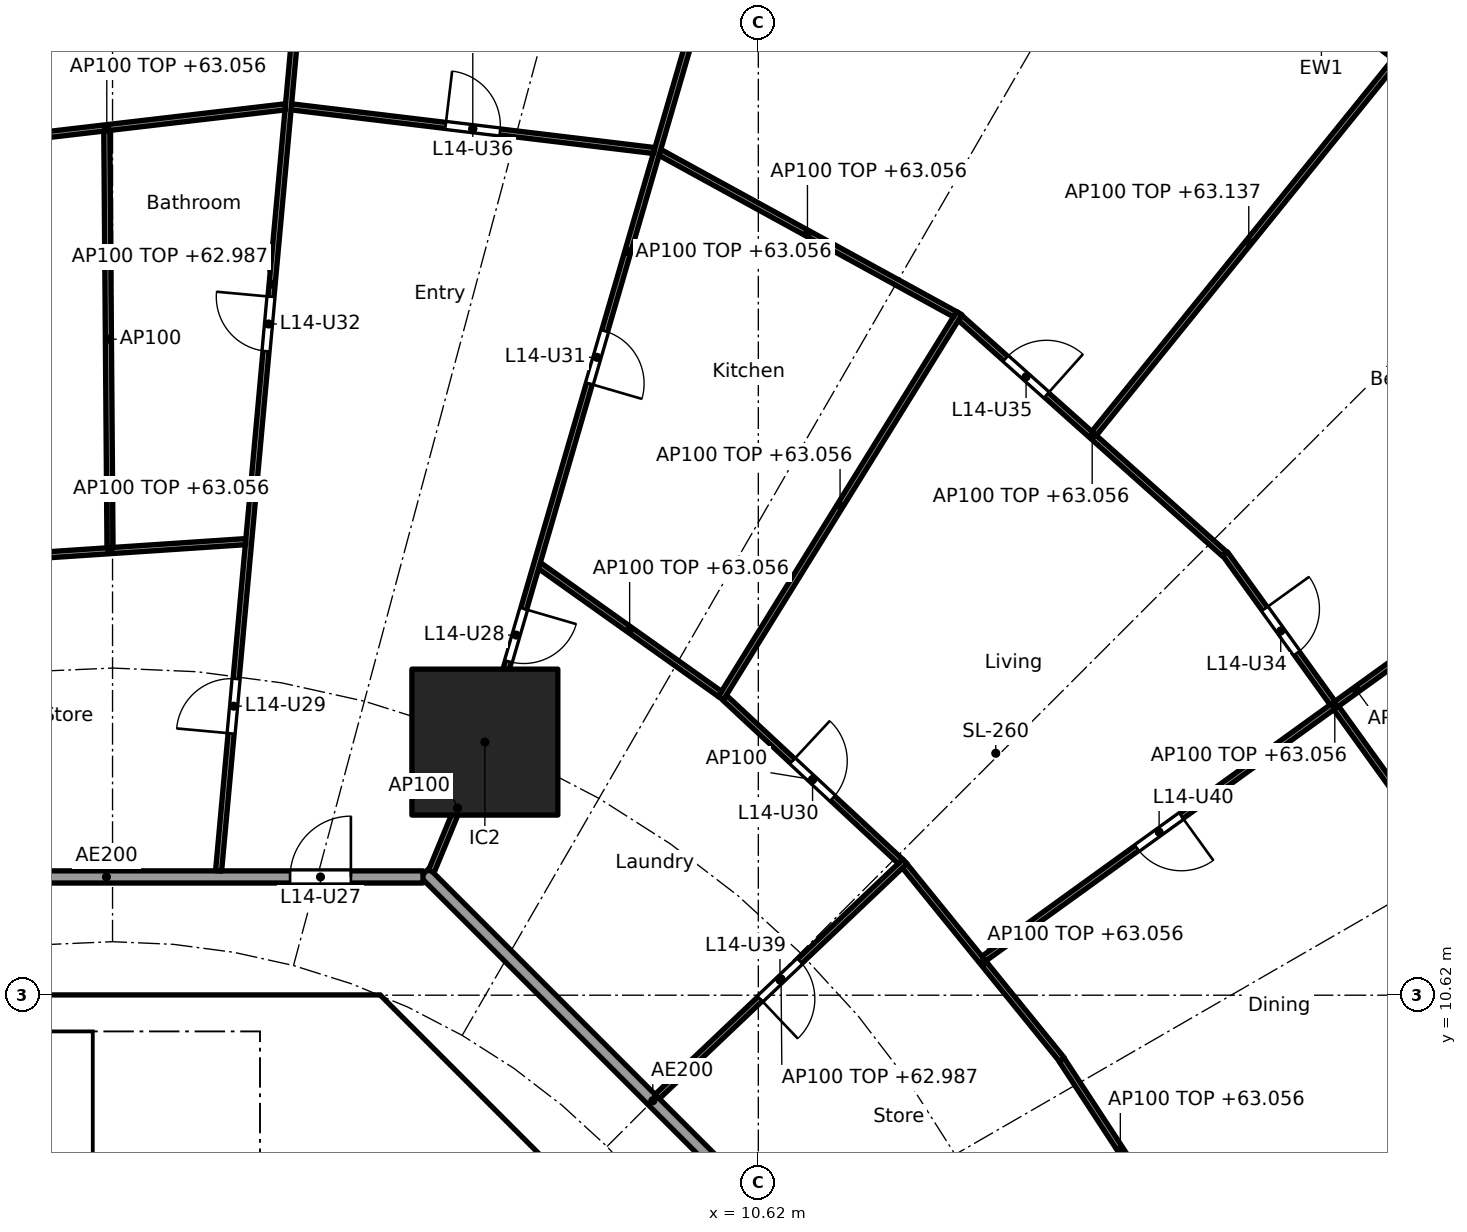
"""IFC4 building model, lengths in metres.
Left out: names, types, materials, properties, quantities, classifications, styles, units other than length and angle.
Written with IfcOpenShell. Run it as: python <this file> out.ifc"""

import sys

from ifc_helpers import new_model, si_unit, direction, frame, frame_2d, origin, origin_2d, place, context, subcontext, project, spatial, polyline, rectangle, outline, extrude, element, fill, save


model = new_model("IFC4")
c1 = context("Model", 3, precision=1e-05, world=origin(), true_north=direction((0.0, 1.0)))
c2 = subcontext(c1, "Body", "Model", "MODEL_VIEW")
j1 = project(units=[si_unit("LENGTHUNIT", "METRE"), si_unit("PLANEANGLEUNIT", "RADIAN")], contexts=[c1])
p1 = place(None, origin())
s1 = spatial("IfcSite", under=j1, at=p1, CompositionType="ELEMENT")
p2 = place(p1, origin())
s2 = spatial("IfcBuilding", under=s1, at=p2, CompositionType="ELEMENT")
p3 = place(p2, frame((0.0, 0.0, 60.3)))
s3 = spatial("IfcBuildingStorey", under=s2, at=p3, CompositionType="ELEMENT", Elevation=60.3)
p4 = place(p3, frame((6.123, 14.782, 0.0), z_axis=(0.0, 0.0, 1.0), x_axis=(1.0, 0.0, 0.0)))
e1 = element("IfcColumn", 1, at=p4, inside=s3, PredefinedType="COLUMN", context=c2, shape_type="SweptSolid", body=[
    extrude(rectangle(XDim=2.4, YDim=2.4, at=origin_2d()), origin(), (0.0, 0.0, 1.0), 3.7),
])
p5 = place(p3, frame((18.582, 28.056, 0.0), z_axis=(0.0, 0.0, 1.0), x_axis=(0.796022293214, -0.605267303517, 0.0)))
e2 = element("IfcWall", 2, at=p5, inside=s3, PredefinedType="SOLIDWALL", context=c2, shape_type="SweptSolid", body=[
    extrude(rectangle(XDim=3.262, YDim=0.25, at=frame_2d((1.631, 0.0))), origin(), (0.0, 0.0, 1.0), 3.44),
])
p6 = place(p5, frame((0.581, 0.0, 0.0)))
e3 = element("IfcOpeningElement", 3, at=p6, cuts=e2, PredefinedType="OPENING", context=c2, shape_type="SweptSolid", body=[
    extrude(rectangle(XDim=2.1, YDim=2.4, at=frame_2d((1.05, 1.2))), frame((0.0, 0.135, 0.0), z_axis=(0.0, -1.0, 0.0), x_axis=(1.0, 0.0, 0.0)), (0.0, 0.0, 1.0), 0.27),
])
p7 = place(p3, frame((9.988, 4.613, 0.0), z_axis=(0.0, 0.0, 1.0), x_axis=(-0.707106781187, 0.707106781187, 0.0)))
e4 = element("IfcWall", 4, at=p7, inside=s3, PredefinedType="SHEAR", context=c2, shape_type="SweptSolid", body=[
    extrude(rectangle(XDim=7.602, YDim=0.6, at=frame_2d((3.801, 0.0))), origin(), (0.0, 0.0, 1.0), 3.44),
])
p8 = place(p7, frame((3.201, 0.0, 0.0)))
e5 = element("IfcOpeningElement", 5, at=p8, cuts=e4, PredefinedType="OPENING", context=c2, shape_type="SweptSolid", body=[
    extrude(rectangle(XDim=1.2, YDim=2.1, at=frame_2d((0.6, 1.05))), frame((0.0, 0.31, 0.0), z_axis=(0.0, -1.0, 0.0), x_axis=(1.0, 0.0, 0.0)), (0.0, 0.0, 1.0), 0.62),
])
p9 = place(p3, frame((4.0, 7.025, 0.0), z_axis=(0.0, 0.0, 1.0), x_axis=(0.0, 1.0, 0.0)))
e6 = element("IfcWall", 6, at=p9, inside=s3, PredefinedType="SOLIDWALL", context=c2, shape_type="SweptSolid", body=[
    extrude(rectangle(XDim=3.0, YDim=0.2, at=frame_2d((1.5, 0.0))), origin(), (0.0, 0.0, 1.0), 3.44),
])
p10 = place(p9, frame((0.925, 0.0, 0.0)))
e7 = element("IfcOpeningElement", 7, at=p10, cuts=e6, PredefinedType="OPENING", context=c2, shape_type="SweptSolid", body=[
    extrude(rectangle(XDim=1.1, YDim=2.1, at=frame_2d((0.55, 1.05))), frame((0.0, 0.11, 0.0), z_axis=(0.0, -1.0, 0.0), x_axis=(1.0, 0.0, 0.0)), (0.0, 0.0, 1.0), 0.22),
])
p11 = place(p3, origin())
e8 = element("IfcWall", 8, at=p11, inside=s3, PredefinedType="SHEAR", context=c2, shape_type="SweptSolid", body=[
    extrude(outline(polyline([(-4.152, 10.025), (-4.401, 9.776), (-4.825, 10.2), (-4.401, 10.625), (4.401, 10.625), (4.825, 10.2), (4.401, 9.776), (4.152, 10.025), (-4.152, 10.025)])), origin(), (0.0, 0.0, 1.0), 3.44),
])
p12 = place(p3, frame((14.832, 6.13, 0.0), z_axis=(0.0, 0.0, 1.0), x_axis=(0.989836541293, 0.142209779978, 0.0)))
e9 = element("IfcWall", 9, at=p12, inside=s3, PredefinedType="PARTITIONING", context=c2, shape_type="SweptSolid", body=[
    extrude(rectangle(XDim=15.909, YDim=0.2, at=frame_2d((7.955, 0.0))), origin(), (0.0, 0.0, 1.0), 2.756),
])
p13 = place(p3, frame((12.635, 5.134, 0.0), z_axis=(0.0, 0.0, 1.0), x_axis=(-0.707106781187, 0.707106781187, 0.0)))
e10 = element("IfcWall", 10, at=p13, inside=s3, PredefinedType="PARTITIONING", context=c2, shape_type="SweptSolid", body=[
    extrude(rectangle(XDim=10.609, YDim=0.2, at=frame_2d((5.305, 0.0))), origin(), (0.0, 0.0, 1.0), 3.44),
])
p14 = place(p3, frame((5.104, 12.565, 0.0), z_axis=(0.0, 0.0, 1.0), x_axis=(-1.0, 0.0, 0.0)))
e11 = element("IfcWall", 11, at=p14, inside=s3, PredefinedType="PARTITIONING", context=c2, shape_type="SweptSolid", body=[
    extrude(rectangle(XDim=10.409, YDim=0.2, at=frame_2d((5.205, 0.0))), origin(), (0.0, 0.0, 1.0), 3.44),
])
p15 = place(p14, frame((1.185, 0.0, 0.0)))
e12 = element("IfcOpeningElement", 12, at=p15, cuts=e11, PredefinedType="OPENING", context=c2, shape_type="SweptSolid", body=[
    extrude(rectangle(XDim=1.0, YDim=2.1, at=frame_2d((0.5, 1.05))), frame((0.0, 0.11, 0.0), z_axis=(0.0, -1.0, 0.0), x_axis=(1.0, 0.0, 0.0)), (0.0, 0.0, 1.0), 0.22),
])
p16 = place(p3, frame((17.537, 6.61, 0.0), z_axis=(0.0, 0.0, 1.0), x_axis=(-0.547637987196, 0.836715384692, 0.0)))
e13 = element("IfcWall", 13, at=p16, inside=s3, PredefinedType="PARTITIONING", context=c2, shape_type="SweptSolid", body=[
    extrude(rectangle(XDim=3.52, YDim=0.1, at=frame_2d((1.76, 0.0))), origin(), (0.0, 0.0, 1.0), 2.756),
])
p17 = place(p3, frame((15.614, 9.559, 0.0), z_axis=(0.0, 0.0, 1.0), x_axis=(-0.63012473344, 0.776493928056, 0.0)))
e14 = element("IfcWall", 14, at=p17, inside=s3, PredefinedType="PARTITIONING", context=c2, shape_type="SweptSolid", body=[
    extrude(rectangle(XDim=4.106, YDim=0.1, at=frame_2d((2.053, 0.0))), origin(), (0.0, 0.0, 1.0), 2.756),
])
p18 = place(p3, frame((21.908, 12.866, 0.0), z_axis=(0.0, 0.0, 1.0), x_axis=(-0.584553256988, 0.811355341231, 0.0)))
e15 = element("IfcWall", 15, at=p18, inside=s3, PredefinedType="PARTITIONING", context=c2, shape_type="SweptSolid", body=[
    extrude(rectangle(XDim=6.184, YDim=0.1, at=frame_2d((3.092, 0.0))), origin(), (0.0, 0.0, 1.0), 2.756),
])
p19 = place(p18, frame((4.163, 0.0, 0.0)))
e16 = element("IfcOpeningElement", 16, at=p19, cuts=e15, PredefinedType="OPENING", context=c2, shape_type="SweptSolid", body=[
    extrude(rectangle(XDim=0.9, YDim=2.1, at=frame_2d((0.45, 1.05))), frame((0.0, 0.06, 0.0), z_axis=(0.0, -1.0, 0.0), x_axis=(1.0, 0.0, 0.0)), (0.0, 0.0, 1.0), 0.12),
])
p20 = place(p3, frame((14.329, 11.221, 0.0), z_axis=(0.0, 0.0, 1.0), x_axis=(0.810671130917, 0.58550176558, 0.0)))
e17 = element("IfcWall", 17, at=p20, inside=s3, PredefinedType="PARTITIONING", context=c2, shape_type="SweptSolid", body=[
    extrude(rectangle(XDim=15.106, YDim=0.1, at=frame_2d((7.553, 0.0))), origin(), (0.0, 0.0, 1.0), 2.837),
])
p21 = place(p20, frame((3.105, 0.0, 0.0)))
e18 = element("IfcOpeningElement", 18, at=p21, cuts=e17, PredefinedType="OPENING", context=c2, shape_type="SweptSolid", body=[
    extrude(rectangle(XDim=0.9, YDim=2.1, at=frame_2d((0.45, 1.05))), frame((0.0, 0.06, 0.0), z_axis=(0.0, -1.0, 0.0), x_axis=(1.0, 0.0, 0.0)), (0.0, 0.0, 1.0), 0.12),
])
p22 = place(p3, frame((8.957, 8.953, 0.0), z_axis=(0.0, 0.0, 1.0), x_axis=(0.725253319157, 0.688482115273, 0.0)))
e19 = element("IfcWall", 19, at=p22, inside=s3, PredefinedType="PARTITIONING", context=c2, shape_type="SweptSolid", body=[
    extrude(rectangle(XDim=5.617, YDim=0.1, at=frame_2d((2.809, 0.0))), origin(), (0.0, 0.0, 1.0), 2.687),
])
p23 = place(p22, frame((2.333, 0.0, 0.0)))
e20 = element("IfcOpeningElement", 20, at=p23, cuts=e19, PredefinedType="OPENING", context=c2, shape_type="SweptSolid", body=[
    extrude(rectangle(XDim=0.9, YDim=2.1, at=frame_2d((0.45, 1.05))), frame((0.0, 0.06, 0.0), z_axis=(0.0, -1.0, 0.0), x_axis=(1.0, 0.0, 0.0)), (0.0, 0.0, 1.0), 0.12),
])
p24 = place(p3, frame((12.958, 12.82, 0.0), z_axis=(0.0, 0.0, 1.0), x_axis=(-0.732022571638, 0.681280378855, 0.0)))
e21 = element("IfcWall", 21, at=p24, inside=s3, PredefinedType="PARTITIONING", context=c2, shape_type="SweptSolid", body=[
    extrude(rectangle(XDim=3.95, YDim=0.1, at=frame_2d((1.975, 0.0))), origin(), (0.0, 0.0, 1.0), 3.44),
])
p25 = place(p24, frame((1.525, 0.0, 0.0)))
e22 = element("IfcOpeningElement", 22, at=p25, cuts=e21, PredefinedType="OPENING", context=c2, shape_type="SweptSolid", body=[
    extrude(rectangle(XDim=0.9, YDim=2.1, at=frame_2d((0.45, 1.05))), frame((0.0, 0.06, 0.0), z_axis=(0.0, -1.0, 0.0), x_axis=(1.0, 0.0, 0.0)), (0.0, 0.0, 1.0), 0.12),
])
p26 = place(p3, frame((18.285, 17.877, 0.0), z_axis=(0.0, 0.0, 1.0), x_axis=(-0.745806142791, 0.666163041136, 0.0)))
e23 = element("IfcWall", 23, at=p26, inside=s3, PredefinedType="PARTITIONING", context=c2, shape_type="SweptSolid", body=[
    extrude(rectangle(XDim=5.831, YDim=0.1, at=frame_2d((2.915, 0.0))), origin(), (0.0, 0.0, 1.0), 2.756),
])
p27 = place(p26, frame((3.923, 0.0, 0.0)))
e24 = element("IfcOpeningElement", 24, at=p27, cuts=e23, PredefinedType="OPENING", context=c2, shape_type="SweptSolid", body=[
    extrude(rectangle(XDim=0.9, YDim=2.1, at=frame_2d((0.45, 1.05))), frame((0.0, 0.06, 0.0), z_axis=(0.0, -1.0, 0.0), x_axis=(1.0, 0.0, 0.0)), (0.0, 0.0, 1.0), 0.12),
])
p28 = place(p3, frame((16.142, 19.858, 0.0), z_axis=(0.0, 0.0, 1.0), x_axis=(0.628738066508, 0.777617157555, 0.0)))
e25 = element("IfcWall", 25, at=p28, inside=s3, PredefinedType="PARTITIONING", context=c2, shape_type="SweptSolid", body=[
    extrude(rectangle(XDim=8.091, YDim=0.1, at=frame_2d((4.045, 0.0))), origin(), (0.0, 0.0, 1.0), 2.837),
])
p29 = place(p3, frame((10.003, 15.503, 0.0), z_axis=(0.0, 0.0, 1.0), x_axis=(0.52645953022, 0.850200189979, 0.0)))
e26 = element("IfcWall", 26, at=p29, inside=s3, PredefinedType="PARTITIONING", context=c2, shape_type="SweptSolid", body=[
    extrude(rectangle(XDim=7.45, YDim=0.1, at=frame_2d((3.725, 0.0))), origin(), (0.0, 0.0, 1.0), 2.756),
])
p30 = place(p3, frame((9.989, 15.574, 0.0), z_axis=(0.0, 0.0, 1.0), x_axis=(-0.81494477814, 0.57953861699, 0.0)))
e27 = element("IfcWall", 27, at=p30, inside=s3, PredefinedType="PARTITIONING", context=c2, shape_type="SweptSolid", body=[
    extrude(rectangle(XDim=3.644, YDim=0.1, at=frame_2d((1.822, 0.0))), origin(), (0.0, 0.0, 1.0), 2.756),
])
p31 = place(p3, frame((13.855, 21.818, 0.0), z_axis=(0.0, 0.0, 1.0), x_axis=(-0.876794415294, 0.480865421203, 0.0)))
e28 = element("IfcWall", 28, at=p31, inside=s3, PredefinedType="PARTITIONING", context=c2, shape_type="SweptSolid", body=[
    extrude(rectangle(XDim=5.536, YDim=0.1, at=frame_2d((2.768, 0.0))), origin(), (0.0, 0.0, 1.0), 2.756),
])
p32 = place(p3, frame((5.243, 12.657, 0.0), z_axis=(0.0, 0.0, 1.0), x_axis=(0.382719158442, 0.923864733477, 0.0)))
e29 = element("IfcWall", 29, at=p32, inside=s3, PredefinedType="PARTITIONING", context=c2, shape_type="SweptSolid", body=[
    extrude(rectangle(XDim=2.25, YDim=0.1, at=frame_2d((1.125, 0.0))), origin(), (0.0, 0.0, 1.0), 3.44),
])
p33 = place(p3, frame((6.137, 14.83, 0.0), z_axis=(0.0, 0.0, 1.0), x_axis=(0.27985745069, 0.960041565399, 0.0)))
e30 = element("IfcWall", 30, at=p33, inside=s3, PredefinedType="PARTITIONING", context=c2, shape_type="SweptSolid", body=[
    extrude(rectangle(XDim=16.705, YDim=0.1, at=frame_2d((8.353, 0.0))), origin(), (0.0, 0.0, 1.0), 2.756),
])
p34 = place(p33, frame((1.334, 0.0, 0.0)))
e31 = element("IfcOpeningElement", 31, at=p34, cuts=e30, PredefinedType="OPENING", context=c2, shape_type="SweptSolid", body=[
    extrude(rectangle(XDim=0.9, YDim=2.1, at=frame_2d((0.45, 1.05))), frame((0.0, 0.06, 0.0), z_axis=(0.0, -1.0, 0.0), x_axis=(1.0, 0.0, 0.0)), (0.0, 0.0, 1.0), 0.12),
])
p35 = place(p33, frame((6.091, 0.0, 0.0)))
e32 = element("IfcOpeningElement", 32, at=p35, cuts=e30, PredefinedType="OPENING", context=c2, shape_type="SweptSolid", body=[
    extrude(rectangle(XDim=0.9, YDim=2.1, at=frame_2d((0.45, 1.05))), frame((0.0, 0.06, 0.0), z_axis=(0.0, -1.0, 0.0), x_axis=(1.0, 0.0, 0.0)), (0.0, 0.0, 1.0), 0.12),
])
p36 = place(p3, frame((8.907, 24.51, 0.0), z_axis=(0.0, 0.0, 1.0), x_axis=(-0.992836798252, 0.119478416615, 0.0)))
e33 = element("IfcWall", 33, at=p36, inside=s3, PredefinedType="PARTITIONING", context=c2, shape_type="SweptSolid", body=[
    extrude(rectangle(XDim=6.01, YDim=0.1, at=frame_2d((3.005, 0.0))), origin(), (0.0, 0.0, 1.0), 2.756),
])
p37 = place(p36, frame((2.555, 0.0, 0.0)))
e34 = element("IfcOpeningElement", 34, at=p37, cuts=e33, PredefinedType="OPENING", context=c2, shape_type="SweptSolid", body=[
    extrude(rectangle(XDim=0.9, YDim=2.1, at=frame_2d((0.45, 1.05))), frame((0.0, 0.06, 0.0), z_axis=(0.0, -1.0, 0.0), x_axis=(1.0, 0.0, 0.0)), (0.0, 0.0, 1.0), 0.12),
])
p38 = place(p3, frame((1.744, 12.664, 0.0), z_axis=(0.0, 0.0, 1.0), x_axis=(0.090893639596, 0.995860605849, 0.0)))
e35 = element("IfcWall", 35, at=p38, inside=s3, PredefinedType="PARTITIONING", context=c2, shape_type="SweptSolid", body=[
    extrude(rectangle(XDim=19.374, YDim=0.1, at=frame_2d((9.687, 0.0))), origin(), (0.0, 0.0, 1.0), 2.687),
])
p39 = place(p38, frame((2.27, 0.0, 0.0)))
e36 = element("IfcOpeningElement", 36, at=p39, cuts=e35, PredefinedType="OPENING", context=c2, shape_type="SweptSolid", body=[
    extrude(rectangle(XDim=0.9, YDim=2.1, at=frame_2d((0.45, 1.05))), frame((0.0, 0.06, 0.0), z_axis=(0.0, -1.0, 0.0), x_axis=(1.0, 0.0, 0.0)), (0.0, 0.0, 1.0), 0.12),
])
p40 = place(p38, frame((8.582, 0.0, 0.0)))
e37 = element("IfcOpeningElement", 37, at=p40, cuts=e35, PredefinedType="OPENING", context=c2, shape_type="SweptSolid", body=[
    extrude(rectangle(XDim=0.9, YDim=2.1, at=frame_2d((0.45, 1.05))), frame((0.0, 0.06, 0.0), z_axis=(0.0, -1.0, 0.0), x_axis=(1.0, 0.0, 0.0)), (0.0, 0.0, 1.0), 0.12),
])
p41 = place(p38, frame((15.548, 0.0, 0.0)))
e38 = element("IfcOpeningElement", 38, at=p41, cuts=e35, PredefinedType="OPENING", context=c2, shape_type="SweptSolid", body=[
    extrude(rectangle(XDim=0.9, YDim=2.1, at=frame_2d((0.45, 1.05))), frame((0.0, 0.06, 0.0), z_axis=(0.0, -1.0, 0.0), x_axis=(1.0, 0.0, 0.0)), (0.0, 0.0, 1.0), 0.12),
])
p42 = place(p3, frame((2.188, 18.079, 0.0), z_axis=(0.0, 0.0, 1.0), x_axis=(-0.997791437766, -0.066424744789, 0.0)))
e39 = element("IfcWall", 39, at=p42, inside=s3, PredefinedType="PARTITIONING", context=c2, shape_type="SweptSolid", body=[
    extrude(rectangle(XDim=4.469, YDim=0.1, at=frame_2d((2.235, 0.0))), origin(), (0.0, 0.0, 1.0), 2.756),
])
p43 = place(p3, frame((2.842, 25.229, 0.0), z_axis=(0.0, 0.0, 1.0), x_axis=(-0.993255612046, -0.115945198862, 0.0)))
e40 = element("IfcWall", 40, at=p43, inside=s3, PredefinedType="PARTITIONING", context=c2, shape_type="SweptSolid", body=[
    extrude(rectangle(XDim=5.913, YDim=0.1, at=frame_2d((2.956, 0.0))), origin(), (0.0, 0.0, 1.0), 2.756),
])
p44 = place(p3, frame((-0.042, 17.98, 0.0), z_axis=(0.0, 0.0, 1.0), x_axis=(-0.007692080119, 0.999970415514, 0.0)))
e41 = element("IfcWall", 41, at=p44, inside=s3, PredefinedType="PARTITIONING", context=c2, shape_type="SweptSolid", body=[
    extrude(rectangle(XDim=6.856, YDim=0.1, at=frame_2d((3.428, 0.0))), origin(), (0.0, 0.0, 1.0), 3.44),
])
p45 = place(p10, origin())
e42 = element("IfcDoor", 42, at=p45, inside=s3, OperationType="SINGLE_SWING_LEFT", PredefinedType="DOOR", context=c2, shape_type="SweptSolid", body=[
    extrude(rectangle(XDim=1.1, YDim=2.1, at=frame_2d((0.55, 1.05))), frame((0.0, 0.025, 0.0), z_axis=(0.0, -1.0, 0.0), x_axis=(1.0, 0.0, 0.0)), (0.0, 0.0, 1.0), 0.05),
])
fill(e7, e42)
p46 = place(p15, frame((1.0, 0.0, 0.0), x_axis=(-1.0, 0.0, 0.0)))
e43 = element("IfcDoor", 43, at=p46, inside=s3, OperationType="SINGLE_SWING_RIGHT", PredefinedType="DOOR", context=c2, shape_type="SweptSolid", body=[
    extrude(rectangle(XDim=1.0, YDim=2.1, at=frame_2d((0.5, 1.05))), frame((0.0, 0.025, 0.0), z_axis=(0.0, -1.0, 0.0), x_axis=(1.0, 0.0, 0.0)), (0.0, 0.0, 1.0), 0.05),
])
fill(e12, e43)
p47 = place(p34, frame((0.9, 0.0, 0.0), x_axis=(-1.0, 0.0, 0.0)))
e44 = element("IfcDoor", 44, at=p47, inside=s3, OperationType="SINGLE_SWING_LEFT", PredefinedType="DOOR", context=c2, shape_type="SweptSolid", body=[
    extrude(rectangle(XDim=0.9, YDim=2.1, at=frame_2d((0.45, 1.05))), frame((0.0, 0.025, 0.0), z_axis=(0.0, -1.0, 0.0), x_axis=(1.0, 0.0, 0.0)), (0.0, 0.0, 1.0), 0.05),
])
fill(e31, e44)
p48 = place(p39, origin())
e45 = element("IfcDoor", 45, at=p48, inside=s3, OperationType="SINGLE_SWING_LEFT", PredefinedType="DOOR", context=c2, shape_type="SweptSolid", body=[
    extrude(rectangle(XDim=0.9, YDim=2.1, at=frame_2d((0.45, 1.05))), frame((0.0, 0.025, 0.0), z_axis=(0.0, -1.0, 0.0), x_axis=(1.0, 0.0, 0.0)), (0.0, 0.0, 1.0), 0.05),
])
fill(e36, e45)
p49 = place(p25, frame((0.9, 0.0, 0.0), x_axis=(-1.0, 0.0, 0.0)))
e46 = element("IfcDoor", 46, at=p49, inside=s3, OperationType="SINGLE_SWING_LEFT", PredefinedType="DOOR", context=c2, shape_type="SweptSolid", body=[
    extrude(rectangle(XDim=0.9, YDim=2.1, at=frame_2d((0.45, 1.05))), frame((0.0, 0.025, 0.0), z_axis=(0.0, -1.0, 0.0), x_axis=(1.0, 0.0, 0.0)), (0.0, 0.0, 1.0), 0.05),
])
fill(e22, e46)
p50 = place(p35, frame((0.9, 0.0, 0.0), x_axis=(-1.0, 0.0, 0.0)))
e47 = element("IfcDoor", 47, at=p50, inside=s3, OperationType="SINGLE_SWING_RIGHT", PredefinedType="DOOR", context=c2, shape_type="SweptSolid", body=[
    extrude(rectangle(XDim=0.9, YDim=2.1, at=frame_2d((0.45, 1.05))), frame((0.0, 0.025, 0.0), z_axis=(0.0, -1.0, 0.0), x_axis=(1.0, 0.0, 0.0)), (0.0, 0.0, 1.0), 0.05),
])
fill(e32, e47)
p51 = place(p40, origin())
e48 = element("IfcDoor", 48, at=p51, inside=s3, OperationType="SINGLE_SWING_RIGHT", PredefinedType="DOOR", context=c2, shape_type="SweptSolid", body=[
    extrude(rectangle(XDim=0.9, YDim=2.1, at=frame_2d((0.45, 1.05))), frame((0.0, 0.025, 0.0), z_axis=(0.0, -1.0, 0.0), x_axis=(1.0, 0.0, 0.0)), (0.0, 0.0, 1.0), 0.05),
])
fill(e37, e48)
p52 = place(p19, frame((0.9, 0.0, 0.0), x_axis=(-1.0, 0.0, 0.0)))
e49 = element("IfcDoor", 49, at=p52, inside=s3, OperationType="SINGLE_SWING_LEFT", PredefinedType="DOOR", context=c2, shape_type="SweptSolid", body=[
    extrude(rectangle(XDim=0.9, YDim=2.1, at=frame_2d((0.45, 1.05))), frame((0.0, 0.025, 0.0), z_axis=(0.0, -1.0, 0.0), x_axis=(1.0, 0.0, 0.0)), (0.0, 0.0, 1.0), 0.05),
])
fill(e16, e49)
p53 = place(p27, frame((0.9, 0.0, 0.0), x_axis=(-1.0, 0.0, 0.0)))
e50 = element("IfcDoor", 50, at=p53, inside=s3, OperationType="SINGLE_SWING_RIGHT", PredefinedType="DOOR", context=c2, shape_type="SweptSolid", body=[
    extrude(rectangle(XDim=0.9, YDim=2.1, at=frame_2d((0.45, 1.05))), frame((0.0, 0.025, 0.0), z_axis=(0.0, -1.0, 0.0), x_axis=(1.0, 0.0, 0.0)), (0.0, 0.0, 1.0), 0.05),
])
fill(e24, e50)
p54 = place(p37, frame((0.9, 0.0, 0.0), x_axis=(-1.0, 0.0, 0.0)))
e51 = element("IfcDoor", 51, at=p54, inside=s3, OperationType="SINGLE_SWING_LEFT", PredefinedType="DOOR", context=c2, shape_type="SweptSolid", body=[
    extrude(rectangle(XDim=0.9, YDim=2.1, at=frame_2d((0.45, 1.05))), frame((0.0, 0.025, 0.0), z_axis=(0.0, -1.0, 0.0), x_axis=(1.0, 0.0, 0.0)), (0.0, 0.0, 1.0), 0.05),
])
fill(e34, e51)
p55 = place(p23, frame((0.9, 0.0, 0.0), x_axis=(-1.0, 0.0, 0.0)))
e52 = element("IfcDoor", 52, at=p55, inside=s3, OperationType="SINGLE_SWING_RIGHT", PredefinedType="DOOR", context=c2, shape_type="SweptSolid", body=[
    extrude(rectangle(XDim=0.9, YDim=2.1, at=frame_2d((0.45, 1.05))), frame((0.0, 0.025, 0.0), z_axis=(0.0, -1.0, 0.0), x_axis=(1.0, 0.0, 0.0)), (0.0, 0.0, 1.0), 0.05),
])
fill(e20, e52)
p56 = place(p21, frame((0.9, 0.0, 0.0), x_axis=(-1.0, 0.0, 0.0)))
e53 = element("IfcDoor", 53, at=p56, inside=s3, OperationType="SINGLE_SWING_LEFT", PredefinedType="DOOR", context=c2, shape_type="SweptSolid", body=[
    extrude(rectangle(XDim=0.9, YDim=2.1, at=frame_2d((0.45, 1.05))), frame((0.0, 0.025, 0.0), z_axis=(0.0, -1.0, 0.0), x_axis=(1.0, 0.0, 0.0)), (0.0, 0.0, 1.0), 0.05),
])
fill(e18, e53)
save(model, sys.argv[1])
